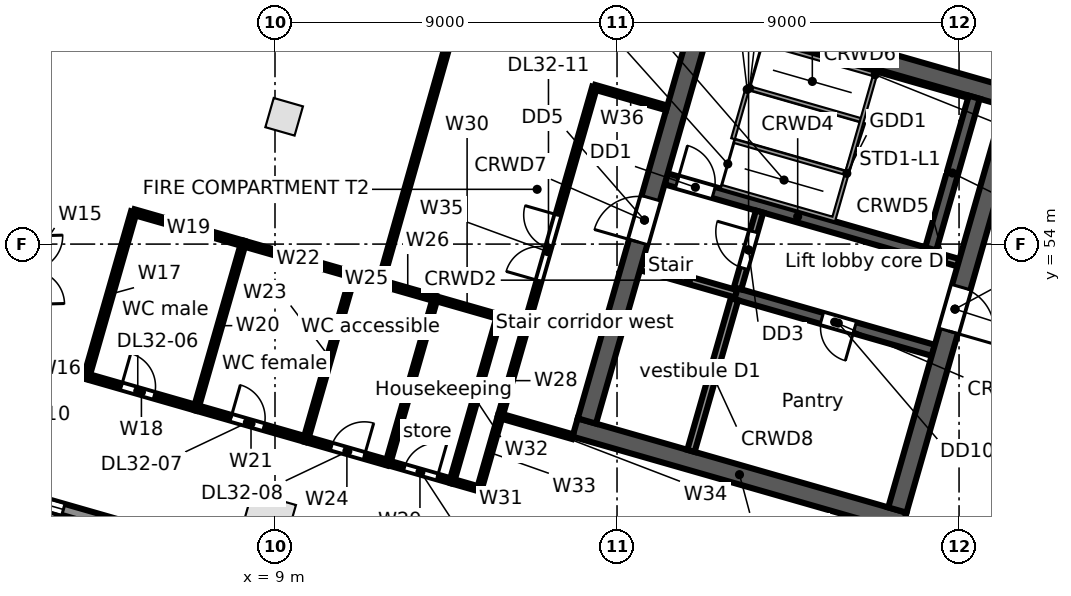
"""IFC4 building model, lengths in metres.
Left out: names, types, materials, properties, quantities, classifications, styles, units other than length and angle.
Written with IfcOpenShell. Run it as: python <this file> out.ifc"""

import sys

from ifc_helpers import new_model, si_unit, direction, frame, frame_2d, origin, origin_2d, place, context, subcontext, project, spatial, rectangle, extrude, element, fill, save


model = new_model("IFC4")
c1 = context("Model", 3, precision=1e-05, world=origin(), true_north=direction((0.0, 1.0)))
c2 = subcontext(c1, "Body", "Model", "MODEL_VIEW")
j1 = project(units=[si_unit("LENGTHUNIT", "METRE"), si_unit("PLANEANGLEUNIT", "RADIAN")], contexts=[c1])
p1 = place(None, origin())
s1 = spatial("IfcSite", under=j1, at=p1, CompositionType="ELEMENT")
p2 = place(p1, origin())
s2 = spatial("IfcBuilding", under=s1, at=p2, CompositionType="ELEMENT")
p3 = place(p2, frame((0.0, 0.0, 162.9)))
s3 = spatial("IfcBuildingStorey", under=s2, at=p3, CompositionType="ELEMENT", Elevation=162.9)
p4 = place(p3, frame((8.81, 46.722, 0.0), z_axis=(0.0, 0.0, 1.0), x_axis=(0.961261695938, -0.275637355817, 0.0)))
e1 = element("IfcColumn", 1, at=p4, inside=s3, PredefinedType="COLUMN", context=c2, shape_type="SweptSolid", body=[
    extrude(rectangle(XDim=1.2, YDim=1.2, at=origin_2d()), origin(), (0.0, 0.0, 1.0), 4.0),
])
p5 = place(p3, frame((9.241, 57.35, 0.0), z_axis=(0.0, 0.0, 1.0), x_axis=(0.961261695938, -0.275637355817, 0.0)))
e2 = element("IfcColumn", 2, at=p5, inside=s3, PredefinedType="COLUMN", context=c2, shape_type="SweptSolid", body=[
    extrude(rectangle(XDim=0.8, YDim=0.8, at=origin_2d()), origin(), (0.0, 0.0, 1.0), 4.0),
])
p6 = place(p3, frame((24.042, 41.106, 0.0), z_axis=(0.0, 0.0, 1.0), x_axis=(-0.961261693976, 0.275637362661, 0.0)))
e3 = element("IfcWall", 3, at=p6, inside=s3, PredefinedType="STANDARD", context=c2, shape_type="SweptSolid", body=[
    extrude(rectangle(XDim=24.948, YDim=0.3, at=frame_2d((12.474, 0.0))), origin(), (0.0, 0.0, 1.0), 3.68),
])
p7 = place(p6, frame((21.441, 0.0, 0.6)))
e4 = element("IfcOpeningElement", 4, at=p7, cuts=e3, PredefinedType="OPENING", context=c2, shape_type="SweptSolid", body=[
    extrude(rectangle(XDim=0.9, YDim=2.4, at=frame_2d((0.45, 1.2))), frame((0.0, 0.16, 0.0), z_axis=(0.0, -1.0, 0.0), x_axis=(1.0, 0.0, 0.0)), (0.0, 0.0, 1.0), 0.32),
])
p8 = place(p6, frame((13.121, 0.0, 0.6)))
e5 = element("IfcOpeningElement", 5, at=p8, cuts=e3, PredefinedType="OPENING", context=c2, shape_type="SweptSolid", body=[
    extrude(rectangle(XDim=0.9, YDim=2.4, at=frame_2d((0.45, 1.2))), frame((0.0, 0.16, 0.0), z_axis=(0.0, -1.0, 0.0), x_axis=(1.0, 0.0, 0.0)), (0.0, 0.0, 1.0), 0.32),
])
p9 = place(p6, frame((10.591, 0.0, 0.0)))
e6 = element("IfcOpeningElement", 6, at=p9, cuts=e3, PredefinedType="OPENING", context=c2, shape_type="SweptSolid", body=[
    extrude(rectangle(XDim=1.8, YDim=2.4, at=frame_2d((0.9, 1.2))), frame((0.0, 0.16, 0.0), z_axis=(0.0, -1.0, 0.0), x_axis=(1.0, 0.0, 0.0)), (0.0, 0.0, 1.0), 0.32),
])
p10 = place(p6, frame((4.8, 0.0, 0.6)))
e7 = element("IfcOpeningElement", 7, at=p10, cuts=e3, PredefinedType="OPENING", context=c2, shape_type="SweptSolid", body=[
    extrude(rectangle(XDim=0.9, YDim=2.4, at=frame_2d((0.45, 1.2))), frame((0.0, 0.16, 0.0), z_axis=(0.0, -1.0, 0.0), x_axis=(1.0, 0.0, 0.0)), (0.0, 0.0, 1.0), 0.32),
])
p11 = place(p6, frame((2.27, 0.0, 0.0)))
e8 = element("IfcOpeningElement", 8, at=p11, cuts=e3, PredefinedType="OPENING", context=c2, shape_type="SweptSolid", body=[
    extrude(rectangle(XDim=1.8, YDim=2.4, at=frame_2d((0.9, 1.2))), frame((0.0, 0.16, 0.0), z_axis=(0.0, -1.0, 0.0), x_axis=(1.0, 0.0, 0.0)), (0.0, 0.0, 1.0), 0.32),
])
p12 = place(p3, frame((37.399, 59.851, 0.0), z_axis=(0.0, 0.0, 1.0), x_axis=(-0.529919986982, -0.848047644532, 0.0)))
e9 = element("IfcWall", 9, at=p12, inside=s3, PredefinedType="STANDARD", context=c2, shape_type="SweptSolid", body=[
    extrude(rectangle(XDim=21.125, YDim=0.3, at=frame_2d((10.562, 0.0))), origin(), (0.0, 0.0, 1.0), 3.68),
])
p13 = place(p12, frame((16.687, 0.0, 0.6)))
e10 = element("IfcOpeningElement", 10, at=p13, cuts=e9, PredefinedType="OPENING", context=c2, shape_type="SweptSolid", body=[
    extrude(rectangle(XDim=0.9, YDim=2.4, at=frame_2d((0.45, 1.2))), frame((0.0, 0.16, 0.0), z_axis=(0.0, -1.0, 0.0), x_axis=(1.0, 0.0, 0.0)), (0.0, 0.0, 1.0), 0.32),
])
p14 = place(p12, frame((6.187, 0.0, 0.6)))
e11 = element("IfcOpeningElement", 11, at=p14, cuts=e9, PredefinedType="OPENING", context=c2, shape_type="SweptSolid", body=[
    extrude(rectangle(XDim=0.9, YDim=2.4, at=frame_2d((0.45, 1.2))), frame((0.0, 0.16, 0.0), z_axis=(0.0, -1.0, 0.0), x_axis=(1.0, 0.0, 0.0)), (0.0, 0.0, 1.0), 0.32),
])
p15 = place(p3, frame((16.897, 49.173, 0.0), z_axis=(0.0, 0.0, 1.0), x_axis=(0.96126248289, -0.275634611374, 0.0)))
e12 = element("IfcWall", 12, at=p15, inside=s3, PredefinedType="SOLIDWALL", context=c2, shape_type="SweptSolid", body=[
    extrude(rectangle(XDim=9.0, YDim=0.5, at=frame_2d((4.5, 0.0))), origin(), (0.0, 0.0, 1.0), 3.68),
])
p16 = place(p3, frame((18.632, 53.409, 0.0), z_axis=(0.0, 0.0, 1.0), x_axis=(0.961247078216, -0.275688328772, 0.0)))
e13 = element("IfcWall", 13, at=p16, inside=s3, PredefinedType="SOLIDWALL", context=c2, shape_type="SweptSolid", body=[
    extrude(rectangle(XDim=2.6, YDim=0.2, at=frame_2d((1.3, 0.0))), origin(), (0.0, 0.0, 1.0), 3.68),
])
p17 = place(p3, frame((21.131, 52.692, 0.0), z_axis=(0.0, 0.0, 1.0), x_axis=(0.961271043721, -0.27560475414, 0.0)))
e14 = element("IfcWall", 14, at=p17, inside=s3, PredefinedType="SOLIDWALL", context=c2, shape_type="SweptSolid", body=[
    extrude(rectangle(XDim=5.4, YDim=0.3, at=frame_2d((2.7, 0.0))), origin(), (0.0, 0.0, 1.0), 3.68),
])
p18 = place(p17, frame((2.35, 0.0, 0.0)))
e15 = element("IfcOpeningElement", 15, at=p18, cuts=e14, PredefinedType="OPENING", context=c2, shape_type="SweptSolid", body=[
    extrude(rectangle(XDim=0.9, YDim=2.1, at=frame_2d((0.45, 1.05))), frame((0.0, 0.16, 0.0), z_axis=(0.0, -1.0, 0.0), x_axis=(1.0, 0.0, 0.0)), (0.0, 0.0, 1.0), 0.32),
])
p19 = place(p3, frame((19.293, 55.716, 0.0), z_axis=(0.0, 0.0, 1.0), x_axis=(0.96125862491, -0.275648065539, 0.0)))
e16 = element("IfcWall", 16, at=p19, inside=s3, PredefinedType="SOLIDWALL", context=c2, shape_type="SweptSolid", body=[
    extrude(rectangle(XDim=7.2, YDim=0.3, at=frame_2d((3.6, 0.0))), origin(), (0.0, 0.0, 1.0), 3.68),
])
p20 = place(p19, frame((0.3, 0.0, 0.0)))
e17 = element("IfcOpeningElement", 17, at=p20, cuts=e16, PredefinedType="OPENING", context=c2, shape_type="SweptSolid", body=[
    extrude(rectangle(XDim=1.0, YDim=2.1, at=frame_2d((0.5, 1.05))), frame((0.0, 0.16, 0.0), z_axis=(0.0, -1.0, 0.0), x_axis=(1.0, 0.0, 0.0)), (0.0, 0.0, 1.0), 0.32),
])
p21 = place(p3, frame((26.214, 53.732, 0.0), z_axis=(0.0, 0.0, 1.0), x_axis=(0.961200870072, -0.275849392554, 0.0)))
e18 = element("IfcWall", 18, at=p21, inside=s3, PredefinedType="SOLIDWALL", context=c2, shape_type="SweptSolid", body=[
    extrude(rectangle(XDim=0.8, YDim=0.2, at=frame_2d((0.4, 0.0))), origin(), (0.0, 0.0, 1.0), 3.68),
])
p22 = place(p3, frame((20.067, 60.228, 0.0), z_axis=(0.0, 0.0, 1.0), x_axis=(0.96126248289, -0.275634611374, 0.0)))
e19 = element("IfcWall", 19, at=p22, inside=s3, PredefinedType="SOLIDWALL", context=c2, shape_type="SweptSolid", body=[
    extrude(rectangle(XDim=9.0, YDim=0.5, at=frame_2d((4.5, 0.0))), origin(), (0.0, 0.0, 1.0), 3.68),
])
p23 = place(p3, frame((17.206, 49.344, 0.0), z_axis=(0.0, 0.0, 1.0), x_axis=(0.275632651182, 0.961263044958, 0.0)))
e20 = element("IfcWall", 20, at=p23, inside=s3, PredefinedType="SOLIDWALL", context=c2, shape_type="SweptSolid", body=[
    extrude(rectangle(XDim=11.0, YDim=0.5, at=frame_2d((5.5, 0.0))), origin(), (0.0, 0.0, 1.0), 3.68),
])
p24 = place(p23, frame((4.9, 0.0, 0.0)))
e21 = element("IfcOpeningElement", 21, at=p24, cuts=e20, PredefinedType="OPENING", context=c2, shape_type="SweptSolid", body=[
    extrude(rectangle(XDim=1.2, YDim=2.1, at=frame_2d((0.6, 1.05))), frame((0.0, 0.26, 0.0), z_axis=(0.0, -1.0, 0.0), x_axis=(1.0, 0.0, 0.0)), (0.0, 0.0, 1.0), 0.52),
])
p25 = place(p3, frame((19.946, 48.559, 0.0), z_axis=(0.0, 0.0, 1.0), x_axis=(0.275668905258, 0.961252648721, 0.0)))
e22 = element("IfcWall", 22, at=p25, inside=s3, PredefinedType="SOLIDWALL", context=c2, shape_type="SweptSolid", body=[
    extrude(rectangle(XDim=4.15, YDim=0.2, at=frame_2d((2.075, 0.0))), origin(), (0.0, 0.0, 1.0), 3.68),
])
p26 = place(p3, frame((21.172, 52.837, 0.0), z_axis=(0.0, 0.0, 1.0), x_axis=(0.275657676022, 0.961255868981, 0.0)))
e23 = element("IfcWall", 23, at=p26, inside=s3, PredefinedType="PARTITIONING", context=c2, shape_type="SweptSolid", body=[
    extrude(rectangle(XDim=2.1, YDim=0.2, at=frame_2d((1.05, 0.0))), origin(), (0.0, 0.0, 1.0), 3.68),
])
p27 = place(p26, frame((0.55, 0.0, 0.0)))
e24 = element("IfcOpeningElement", 24, at=p27, cuts=e23, PredefinedType="OPENING", context=c2, shape_type="SweptSolid", body=[
    extrude(rectangle(XDim=1.0, YDim=2.1, at=frame_2d((0.5, 1.05))), frame((0.0, 0.11, 0.0), z_axis=(0.0, -1.0, 0.0), x_axis=(1.0, 0.0, 0.0)), (0.0, 0.0, 1.0), 0.22),
])
p28 = place(p3, frame((26.256, 53.876, 0.0), z_axis=(0.0, 0.0, 1.0), x_axis=(0.275614546295, 0.961268236171, 0.0)))
e25 = element("IfcWall", 25, at=p28, inside=s3, PredefinedType="SOLIDWALL", context=c2, shape_type="SweptSolid", body=[
    extrude(rectangle(XDim=4.15, YDim=0.3, at=frame_2d((2.075, 0.0))), origin(), (0.0, 0.0, 1.0), 3.68),
])
p29 = place(p3, frame((25.377, 47.002, 0.0), z_axis=(0.0, 0.0, 1.0), x_axis=(0.275632651182, 0.961263044958, 0.0)))
e26 = element("IfcWall", 26, at=p29, inside=s3, PredefinedType="SOLIDWALL", context=c2, shape_type="SweptSolid", body=[
    extrude(rectangle(XDim=11.0, YDim=0.5, at=frame_2d((5.5, 0.0))), origin(), (0.0, 0.0, 1.0), 3.68),
])
p30 = place(p29, frame((4.9, 0.0, 0.0)))
e27 = element("IfcOpeningElement", 27, at=p30, cuts=e26, PredefinedType="OPENING", context=c2, shape_type="SweptSolid", body=[
    extrude(rectangle(XDim=1.2, YDim=2.1, at=frame_2d((0.6, 1.05))), frame((0.0, 0.26, 0.0), z_axis=(0.0, -1.0, 0.0), x_axis=(1.0, 0.0, 0.0)), (0.0, 0.0, 1.0), 0.52),
])
p31 = place(p3, frame((2.601, 50.932, 0.0), z_axis=(0.0, 0.0, 1.0), x_axis=(0.961197773994, -0.27586018065, 0.0)))
e28 = element("IfcWall", 28, at=p31, inside=s3, PredefinedType="PARTITIONING", context=c2, shape_type="SweptSolid", body=[
    extrude(rectangle(XDim=1.5, YDim=0.125, at=frame_2d((0.75, 0.0))), origin(), (0.0, 0.0, 1.0), 3.68),
])
p32 = place(p3, frame((4.043, 50.518, 0.0), z_axis=(0.0, 0.0, 1.0), x_axis=(0.275745553681, 0.96123066411, 0.0)))
e29 = element("IfcWall", 29, at=p32, inside=s3, PredefinedType="PARTITIONING", context=c2, shape_type="SweptSolid", body=[
    extrude(rectangle(XDim=4.5, YDim=0.15, at=frame_2d((2.25, 0.0))), origin(), (0.0, 0.0, 1.0), 3.68),
])
p33 = place(p3, frame((4.043, 50.518, 0.0), z_axis=(0.0, 0.0, 1.0), x_axis=(0.961247103494, -0.275688240636, 0.0)))
e30 = element("IfcWall", 30, at=p33, inside=s3, PredefinedType="PARTITIONING", context=c2, shape_type="SweptSolid", body=[
    extrude(rectangle(XDim=3.0, YDim=0.15, at=frame_2d((1.5, 0.0))), origin(), (0.0, 0.0, 1.0), 3.68),
])
p34 = place(p33, frame((0.95, 0.0, 0.0)))
e31 = element("IfcOpeningElement", 31, at=p34, cuts=e30, PredefinedType="OPENING", context=c2, shape_type="SweptSolid", body=[
    extrude(rectangle(XDim=0.9, YDim=2.1, at=frame_2d((0.45, 1.05))), frame((0.0, 0.085, 0.0), z_axis=(0.0, -1.0, 0.0), x_axis=(1.0, 0.0, 0.0)), (0.0, 0.0, 1.0), 0.17),
])
p35 = place(p3, frame((5.284, 54.844, 0.0), z_axis=(0.0, 0.0, 1.0), x_axis=(0.961243927922, -0.275699312717, 0.0)))
e32 = element("IfcWall", 32, at=p35, inside=s3, PredefinedType="PARTITIONING", context=c2, shape_type="SweptSolid", body=[
    extrude(rectangle(XDim=2.999, YDim=0.15, at=frame_2d((1.5, 0.0))), origin(), (0.0, 0.0, 1.0), 3.68),
])
p36 = place(p3, frame((6.927, 49.691, 0.0), z_axis=(0.0, 0.0, 1.0), x_axis=(0.275530671241, 0.961292280841, 0.0)))
e33 = element("IfcWall", 33, at=p36, inside=s3, PredefinedType="PARTITIONING", context=c2, shape_type="SweptSolid", body=[
    extrude(rectangle(XDim=4.5, YDim=0.125, at=frame_2d((2.25, 0.0))), origin(), (0.0, 0.0, 1.0), 3.68),
])
p37 = place(p3, frame((6.927, 49.691, 0.0), z_axis=(0.0, 0.0, 1.0), x_axis=(0.961268664977, -0.27561305073, 0.0)))
e34 = element("IfcWall", 34, at=p37, inside=s3, PredefinedType="PARTITIONING", context=c2, shape_type="SweptSolid", body=[
    extrude(rectangle(XDim=3.0, YDim=0.15, at=frame_2d((1.5, 0.0))), origin(), (0.0, 0.0, 1.0), 2.748),
])
p38 = place(p37, frame((0.95, 0.0, 0.0)))
e35 = element("IfcOpeningElement", 35, at=p38, cuts=e34, PredefinedType="OPENING", context=c2, shape_type="SweptSolid", body=[
    extrude(rectangle(XDim=0.9, YDim=2.1, at=frame_2d((0.45, 1.05))), frame((0.0, 0.085, 0.0), z_axis=(0.0, -1.0, 0.0), x_axis=(1.0, 0.0, 0.0)), (0.0, 0.0, 1.0), 0.17),
])
p39 = place(p3, frame((8.167, 54.017, 0.0), z_axis=(0.0, 0.0, 1.0), x_axis=(0.961247103494, -0.275688240636, 0.0)))
e36 = element("IfcWall", 36, at=p39, inside=s3, PredefinedType="PARTITIONING", context=c2, shape_type="SweptSolid", body=[
    extrude(rectangle(XDim=3.0, YDim=0.15, at=frame_2d((1.5, 0.0))), origin(), (0.0, 0.0, 1.0), 2.748),
])
p40 = place(p3, frame((9.811, 48.864, 0.0), z_axis=(0.0, 0.0, 1.0), x_axis=(0.275545040649, 0.96128816209, 0.0)))
e37 = element("IfcWall", 37, at=p40, inside=s3, PredefinedType="PARTITIONING", context=c2, shape_type="SweptSolid", body=[
    extrude(rectangle(XDim=4.5, YDim=0.125, at=frame_2d((2.25, 0.0))), origin(), (0.0, 0.0, 1.0), 3.68),
])
p41 = place(p3, frame((9.811, 48.864, 0.0), z_axis=(0.0, 0.0, 1.0), x_axis=(0.961236680145, -0.275724581318, 0.0)))
e38 = element("IfcWall", 38, at=p41, inside=s3, PredefinedType="PARTITIONING", context=c2, shape_type="SweptSolid", body=[
    extrude(rectangle(XDim=2.249, YDim=0.15, at=frame_2d((1.125, 0.0))), origin(), (0.0, 0.0, 1.0), 3.68),
])
p42 = place(p41, frame((0.7, 0.0, 0.0)))
e39 = element("IfcOpeningElement", 39, at=p42, cuts=e38, PredefinedType="OPENING", context=c2, shape_type="SweptSolid", body=[
    extrude(rectangle(XDim=0.9, YDim=2.1, at=frame_2d((0.45, 1.05))), frame((0.0, 0.085, 0.0), z_axis=(0.0, -1.0, 0.0), x_axis=(1.0, 0.0, 0.0)), (0.0, 0.0, 1.0), 0.17),
])
p43 = place(p3, frame((11.051, 53.19, 0.0), z_axis=(0.0, 0.0, 1.0), x_axis=(0.961154610169, -0.276010534854, 0.0)))
e40 = element("IfcWall", 40, at=p43, inside=s3, PredefinedType="PARTITIONING", context=c2, shape_type="SweptSolid", body=[
    extrude(rectangle(XDim=0.75, YDim=0.15, at=frame_2d((0.375, 0.0))), origin(), (0.0, 0.0, 1.0), 3.68),
])
p44 = place(p3, frame((11.772, 52.983, 0.0), z_axis=(0.0, 0.0, 1.0), x_axis=(0.961382563126, -0.275215492508, 0.0)))
e41 = element("IfcWall", 41, at=p44, inside=s3, PredefinedType="PARTITIONING", context=c2, shape_type="SweptSolid", body=[
    extrude(rectangle(XDim=1.5, YDim=0.15, at=frame_2d((0.75, 0.0))), origin(), (0.0, 0.0, 1.0), 3.68),
])
p45 = place(p3, frame((11.772, 52.983, 0.0), z_axis=(0.0, 0.0, 1.0), x_axis=(0.272554241659, 0.96214041873, 0.0)))
e42 = element("IfcWall", 42, at=p45, inside=s3, PredefinedType="PARTITIONING", context=c2, shape_type="SweptSolid", body=[
    extrude(rectangle(XDim=14.885, YDim=0.125, at=frame_2d((7.443, 0.0))), origin(), (0.0, 0.0, 1.0), 2.748),
])
p46 = place(p3, frame((11.973, 48.244, 0.0), z_axis=(0.0, 0.0, 1.0), x_axis=(0.275781295989, 0.961220410095, 0.0)))
e43 = element("IfcWall", 43, at=p46, inside=s3, PredefinedType="PARTITIONING", context=c2, shape_type="SweptSolid", body=[
    extrude(rectangle(XDim=4.501, YDim=0.125, at=frame_2d((2.25, 0.0))), origin(), (0.0, 0.0, 1.0), 3.68),
])
p47 = place(p3, frame((11.973, 48.244, 0.0), z_axis=(0.0, 0.0, 1.0), x_axis=(0.96136592135, -0.275273618907, 0.0)))
e44 = element("IfcWall", 44, at=p47, inside=s3, PredefinedType="PARTITIONING", context=c2, shape_type="SweptSolid", body=[
    extrude(rectangle(XDim=1.751, YDim=0.125, at=frame_2d((0.875, 0.0))), origin(), (0.0, 0.0, 1.0), 3.68),
])
p48 = place(p47, frame((0.45, 0.0, 0.0)))
e45 = element("IfcOpeningElement", 45, at=p48, cuts=e44, PredefinedType="OPENING", context=c2, shape_type="SweptSolid", body=[
    extrude(rectangle(XDim=0.9, YDim=2.1, at=frame_2d((0.45, 1.05))), frame((0.0, 0.073, 0.0), z_axis=(0.0, -1.0, 0.0), x_axis=(1.0, 0.0, 0.0)), (0.0, 0.0, 1.0), 0.145),
])
p49 = place(p3, frame((13.214, 52.57, 0.0), z_axis=(0.0, 0.0, 1.0), x_axis=(0.961276075309, -0.275587204055, 0.0)))
e46 = element("IfcWall", 46, at=p49, inside=s3, PredefinedType="PARTITIONING", context=c2, shape_type="SweptSolid", body=[
    extrude(rectangle(XDim=1.75, YDim=0.125, at=frame_2d((0.875, 0.0))), origin(), (0.0, 0.0, 1.0), 3.68),
])
p50 = place(p3, frame((13.656, 47.762, 0.0), z_axis=(0.0, 0.0, 1.0), x_axis=(0.961154610169, -0.276010534854, 0.0)))
e47 = element("IfcWall", 47, at=p50, inside=s3, PredefinedType="PARTITIONING", context=c2, shape_type="SweptSolid", body=[
    extrude(rectangle(XDim=0.75, YDim=0.125, at=frame_2d((0.375, 0.0))), origin(), (0.0, 0.0, 1.0), 3.68),
])
p51 = place(p3, frame((13.656, 47.762, 0.0), z_axis=(0.0, 0.0, 1.0), x_axis=(0.275545040649, 0.96128816209, 0.0)))
e48 = element("IfcWall", 48, at=p51, inside=s3, PredefinedType="PARTITIONING", context=c2, shape_type="SweptSolid", body=[
    extrude(rectangle(XDim=4.5, YDim=0.125, at=frame_2d((2.25, 0.0))), origin(), (0.0, 0.0, 1.0), 3.68),
])
p52 = place(p3, frame((14.377, 47.555, 0.0), z_axis=(0.0, 0.0, 1.0), x_axis=(0.275446387355, 0.961316434736, 0.0)))
e49 = element("IfcWall", 49, at=p52, inside=s3, PredefinedType="PARTITIONING", context=c2, shape_type="SweptSolid", body=[
    extrude(rectangle(XDim=2.0, YDim=0.125, at=frame_2d((1.0, 0.0))), origin(), (0.0, 0.0, 1.0), 3.68),
])
p53 = place(p3, frame((14.928, 49.478, 0.0), z_axis=(0.0, 0.0, 1.0), x_axis=(0.961243778232, -0.27569983462, 0.0)))
e50 = element("IfcWall", 50, at=p53, inside=s3, PredefinedType="PARTITIONING", context=c2, shape_type="SweptSolid", body=[
    extrude(rectangle(XDim=1.977, YDim=0.125, at=frame_2d((0.988, 0.0))), origin(), (0.0, 0.0, 1.0), 3.68),
])
p54 = place(p3, frame((14.928, 49.478, 0.0), z_axis=(0.0, 0.0, 1.0), x_axis=(0.275674053528, 0.961251172281, 0.0)))
e51 = element("IfcWall", 51, at=p54, inside=s3, PredefinedType="PARTITIONING", context=c2, shape_type="SweptSolid", body=[
    extrude(rectangle(XDim=9.0, YDim=0.125, at=frame_2d((4.5, 0.0))), origin(), (0.0, 0.0, 1.0), 2.748),
])
p55 = place(p54, frame((3.7, 0.0, 0.0)))
e52 = element("IfcOpeningElement", 52, at=p55, cuts=e51, PredefinedType="OPENING", context=c2, shape_type="SweptSolid", body=[
    extrude(rectangle(XDim=1.8, YDim=2.1, at=frame_2d((0.9, 1.05))), frame((0.0, 0.073, 0.0), z_axis=(0.0, -1.0, 0.0), x_axis=(1.0, 0.0, 0.0)), (0.0, 0.0, 1.0), 0.145),
])
p56 = place(p3, frame((17.409, 58.129, 0.0), z_axis=(0.0, 0.0, 1.0), x_axis=(0.961253165474, -0.275667103345, 0.0)))
e53 = element("IfcWall", 53, at=p56, inside=s3, PredefinedType="PARTITIONING", context=c2, shape_type="SweptSolid", body=[
    extrude(rectangle(XDim=1.977, YDim=0.125, at=frame_2d((0.988, 0.0))), origin(), (0.0, 0.0, 1.0), 3.68),
])
p57 = place(p7, origin())
e54 = element("IfcWindow", 54, at=p57, inside=s3, PartitioningType="SINGLE_PANEL", PredefinedType="WINDOW", context=c2, shape_type="SweptSolid", body=[
    extrude(rectangle(XDim=0.9, YDim=2.4, at=frame_2d((0.45, 1.2))), frame((0.0, 0.03, 0.0), z_axis=(0.0, -1.0, 0.0), x_axis=(1.0, 0.0, 0.0)), (0.0, 0.0, 1.0), 0.06),
])
fill(e4, e54)
p58 = place(p20, origin())
e55 = element("IfcDoor", 55, at=p58, inside=s3, OperationType="SINGLE_SWING_LEFT", PredefinedType="DOOR", context=c2, shape_type="SweptSolid", body=[
    extrude(rectangle(XDim=1.0, YDim=2.1, at=frame_2d((0.5, 1.05))), frame((0.0, 0.025, 0.0), z_axis=(0.0, -1.0, 0.0), x_axis=(1.0, 0.0, 0.0)), (0.0, 0.0, 1.0), 0.05),
])
fill(e17, e55)
p59 = place(p27, origin())
e56 = element("IfcDoor", 56, at=p59, inside=s3, OperationType="SINGLE_SWING_RIGHT", PredefinedType="DOOR", context=c2, shape_type="SweptSolid", body=[
    extrude(rectangle(XDim=1.0, YDim=2.1, at=frame_2d((0.5, 1.05))), frame((0.0, 0.025, 0.0), z_axis=(0.0, -1.0, 0.0), x_axis=(1.0, 0.0, 0.0)), (0.0, 0.0, 1.0), 0.05),
])
fill(e24, e56)
p60 = place(p24, origin())
e57 = element("IfcDoor", 57, at=p60, inside=s3, OperationType="SINGLE_SWING_LEFT", PredefinedType="DOOR", context=c2, shape_type="SweptSolid", body=[
    extrude(rectangle(XDim=1.2, YDim=2.1, at=frame_2d((0.6, 1.05))), frame((0.0, 0.025, 0.0), z_axis=(0.0, -1.0, 0.0), x_axis=(1.0, 0.0, 0.0)), (0.0, 0.0, 1.0), 0.05),
])
fill(e21, e57)
p61 = place(p30, frame((1.2, 0.0, 0.0), z_axis=(0.0, 0.0, 1.0), x_axis=(-1.0, 0.0, 0.0)))
e58 = element("IfcDoor", 58, at=p61, inside=s3, OperationType="SINGLE_SWING_RIGHT", PredefinedType="DOOR", context=c2, shape_type="SweptSolid", body=[
    extrude(rectangle(XDim=1.2, YDim=2.1, at=frame_2d((0.6, 1.05))), frame((0.0, 0.025, 0.0), z_axis=(0.0, -1.0, 0.0), x_axis=(1.0, 0.0, 0.0)), (0.0, 0.0, 1.0), 0.05),
])
fill(e27, e58)
p62 = place(p18, frame((0.9, 0.0, 0.0), z_axis=(0.0, 0.0, 1.0), x_axis=(-1.0, 0.0, 0.0)))
e59 = element("IfcDoor", 59, at=p62, inside=s3, OperationType="SINGLE_SWING_LEFT", PredefinedType="DOOR", context=c2, shape_type="SweptSolid", body=[
    extrude(rectangle(XDim=0.9, YDim=2.1, at=frame_2d((0.45, 1.05))), frame((0.0, 0.025, 0.0), z_axis=(0.0, -1.0, 0.0), x_axis=(1.0, 0.0, 0.0)), (0.0, 0.0, 1.0), 0.05),
])
fill(e15, e59)
p63 = place(p34, origin())
e60 = element("IfcDoor", 60, at=p63, inside=s3, OperationType="SINGLE_SWING_LEFT", PredefinedType="DOOR", context=c2, shape_type="SweptSolid", body=[
    extrude(rectangle(XDim=0.9, YDim=2.1, at=frame_2d((0.45, 1.05))), frame((0.0, 0.025, 0.0), z_axis=(0.0, -1.0, 0.0), x_axis=(1.0, 0.0, 0.0)), (0.0, 0.0, 1.0), 0.05),
])
fill(e31, e60)
p64 = place(p38, origin())
e61 = element("IfcDoor", 61, at=p64, inside=s3, OperationType="SINGLE_SWING_LEFT", PredefinedType="DOOR", context=c2, shape_type="SweptSolid", body=[
    extrude(rectangle(XDim=0.9, YDim=2.1, at=frame_2d((0.45, 1.05))), frame((0.0, 0.025, 0.0), z_axis=(0.0, -1.0, 0.0), x_axis=(1.0, 0.0, 0.0)), (0.0, 0.0, 1.0), 0.05),
])
fill(e35, e61)
p65 = place(p42, origin())
e62 = element("IfcDoor", 62, at=p65, inside=s3, OperationType="SINGLE_SWING_RIGHT", PredefinedType="DOOR", context=c2, shape_type="SweptSolid", body=[
    extrude(rectangle(XDim=0.9, YDim=2.1, at=frame_2d((0.45, 1.05))), frame((0.0, 0.025, 0.0), z_axis=(0.0, -1.0, 0.0), x_axis=(1.0, 0.0, 0.0)), (0.0, 0.0, 1.0), 0.05),
])
fill(e39, e62)
p66 = place(p48, origin())
e63 = element("IfcDoor", 63, at=p66, inside=s3, OperationType="SINGLE_SWING_RIGHT", PredefinedType="DOOR", context=c2, shape_type="SweptSolid", body=[
    extrude(rectangle(XDim=0.9, YDim=2.1, at=frame_2d((0.45, 1.05))), frame((0.0, 0.025, 0.0), z_axis=(0.0, -1.0, 0.0), x_axis=(1.0, 0.0, 0.0)), (0.0, 0.0, 1.0), 0.05),
])
fill(e45, e63)
p67 = place(p55, origin())
e64 = element("IfcDoor", 64, at=p67, inside=s3, OperationType="DOUBLE_DOOR_SINGLE_SWING", PredefinedType="DOOR", context=c2, shape_type="SweptSolid", body=[
    extrude(rectangle(XDim=1.8, YDim=2.1, at=frame_2d((0.9, 1.05))), frame((0.0, 0.025, 0.0), z_axis=(0.0, -1.0, 0.0), x_axis=(1.0, 0.0, 0.0)), (0.0, 0.0, 1.0), 0.05),
])
fill(e52, e64)
save(model, sys.argv[1])
